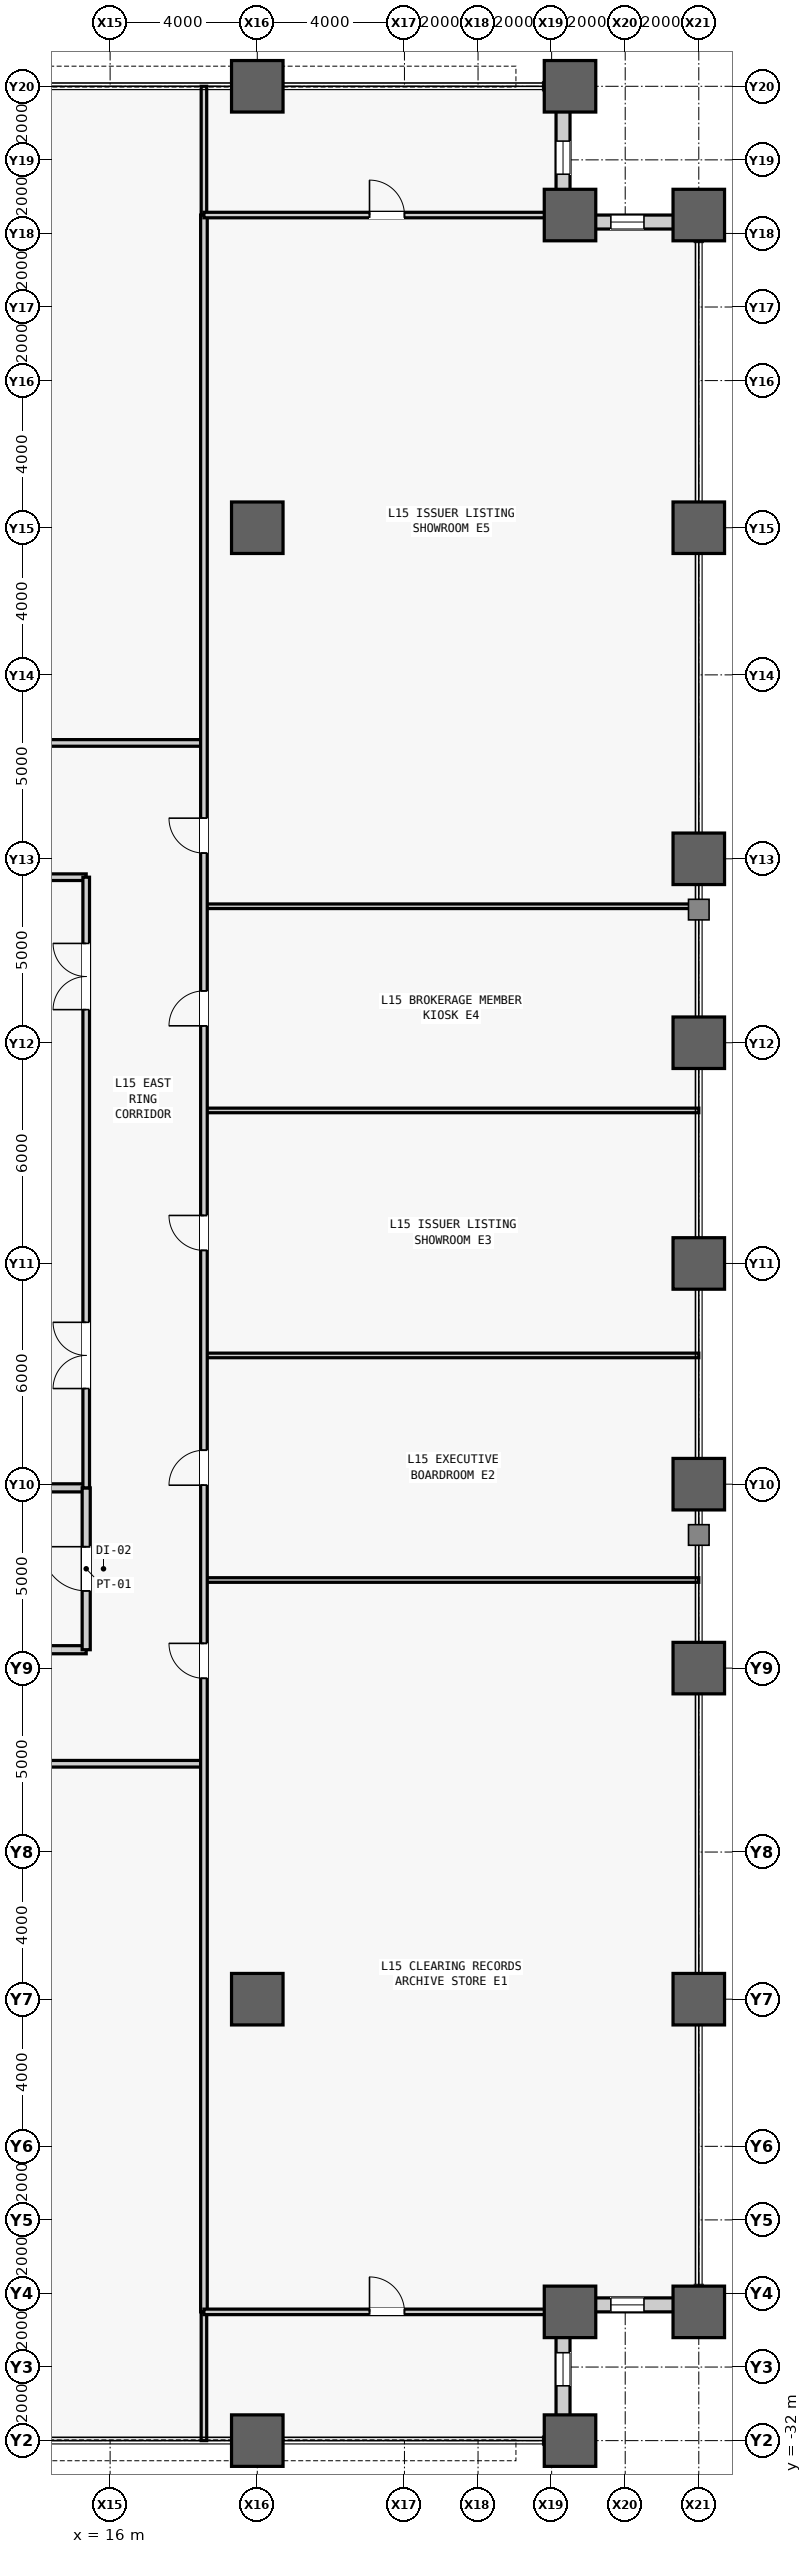
"""IFC4 building model, lengths in metres.
Left out: names, types, materials, properties, quantities, classifications, styles, units other than length and angle.
Written with IfcOpenShell. Run it as: python <this file> out.ifc"""

import sys

from ifc_helpers import new_model, si_unit, direction, frame, frame_2d, origin, origin_2d, place, context, subcontext, project, spatial, rectangle, hollow_rectangle, extrude, source, transform, mapped, element, fill, save


model = new_model("IFC4")
c1 = context("Model", 3, precision=1e-05, world=origin(), true_north=direction((0.0, 1.0)))
c2 = subcontext(c1, "Body", "Model", "MODEL_VIEW")
j1 = project(units=[si_unit("LENGTHUNIT", "METRE"), si_unit("PLANEANGLEUNIT", "RADIAN")], contexts=[c1])
p1 = place(None, origin())
s1 = spatial("IfcSite", under=j1, at=p1, CompositionType="ELEMENT")
p2 = place(p1, origin())
s2 = spatial("IfcBuilding", under=s1, at=p2, CompositionType="ELEMENT")
p3 = place(p2, frame((0.0, 0.0, 70.4)))
s3 = spatial("IfcBuildingStorey", under=s2, at=p3, CompositionType="ELEMENT", Elevation=70.4)
m1 = source(origin(), c2, "Body", "SweptSolid", [
    extrude(hollow_rectangle(XDim=1.4, YDim=1.4, WallThickness=0.075, at=origin_2d()), origin(), (0.0, 0.0, 1.0), 4.2),
])
for number, where, z_axis, x_axis in (
    (1, (20.0, -32.0, 0.0), (0.0, 0.0, 1.0), (1.0, 0.0, 0.0)),
    (2, (20.0, -20.0, 0.0), (0.0, 0.0, 1.0), (1.0, 0.0, 0.0)),
    (3, (20.0, 20.0, 0.0), (0.0, 0.0, 1.0), (1.0, 0.0, 0.0)),
    (4, (20.0, 32.0, 0.0), (0.0, 0.0, 1.0), (1.0, 0.0, 0.0)),
    (5, (28.5, -32.0, 0.0), (0.0, 0.0, 1.0), (1.0, 0.0, 0.0)),
    (6, (28.5, -28.5, 0.0), (0.0, 0.0, 1.0), (1.0, 0.0, 0.0)),
    (7, (28.5, 28.5, 0.0), (0.0, 0.0, 1.0), (1.0, 0.0, 0.0)),
    (8, (28.5, 32.0, 0.0), (0.0, 0.0, 1.0), (1.0, 0.0, 0.0)),
    (9, (32.0, -28.5, 0.0), (0.0, 0.0, 1.0), (1.0, 0.0, 0.0)),
    (10, (32.0, -20.0, 0.0), (0.0, 0.0, 1.0), (1.0, 0.0, 0.0)),
    (11, (32.0, -11.0, 0.0), (0.0, 0.0, 1.0), (1.0, 0.0, 0.0)),
    (12, (32.0, -6.0, 0.0), (0.0, 0.0, 1.0), (1.0, 0.0, 0.0)),
    (13, (32.0, 0.0, 0.0), (0.0, 0.0, 1.0), (1.0, 0.0, 0.0)),
    (14, (32.0, 6.0, 0.0), (0.0, 0.0, 1.0), (1.0, 0.0, 0.0)),
    (15, (32.0, 11.0, 0.0), (0.0, 0.0, 1.0), (1.0, 0.0, 0.0)),
    (16, (32.0, 20.0, 0.0), (0.0, 0.0, 1.0), (1.0, 0.0, 0.0)),
    (17, (32.0, 28.5, 0.0), (0.0, 0.0, 1.0), (1.0, 0.0, 0.0)),
):
    element("IfcColumn", number, at=place(p3, frame(where, z_axis=z_axis, x_axis=x_axis)), inside=s3, PredefinedType="COLUMN", context=c2, shape_type="MappedRepresentation", body=[
        mapped(m1, transform((0.0, 0.0, 0.0), scale=1.0)),
    ])
m2 = source(origin(), c2, "Body", "SweptSolid", [
    extrude(rectangle(XDim=3.12, YDim=0.38, at=frame_2d((1.56, 0.0))), origin(), (0.0, 0.0, 1.0), 3.245),
])
p4 = place(p3, frame((28.31, -31.62, 0.0), z_axis=(0.0, 0.0, 1.0), x_axis=(0.0, 1.0, 0.0)))
e18 = element("IfcWall", 18, at=p4, inside=s3, PredefinedType="STANDARD", context=c2, shape_type="MappedRepresentation", body=[
    mapped(m2, transform((0.0, 0.0, 0.0), scale=1.0)),
])
m3 = source(origin(), c2, "Body", "SweptSolid", [
    extrude(rectangle(XDim=0.9, YDim=2.4, at=frame_2d((0.45, 1.2))), frame((0.0, 0.2, 0.0), z_axis=(0.0, -1.0, 0.0), x_axis=(1.0, 0.0, 0.0)), (0.0, 0.0, 1.0), 0.4),
])
p5 = place(p4, frame((1.11, 0.0, 0.5)))
e19 = element("IfcOpeningElement", 19, at=p5, cuts=e18, PredefinedType="OPENING", context=c2, shape_type="MappedRepresentation", body=[
    mapped(m3, transform((0.0, 0.0, 0.0), scale=1.0)),
])
p6 = place(p3, frame((28.5, -28.31, 0.0), z_axis=(0.0, 0.0, 1.0), x_axis=(1.0, 0.0, 0.0)))
e20 = element("IfcWall", 20, at=p6, inside=s3, PredefinedType="STANDARD", context=c2, shape_type="MappedRepresentation", body=[
    mapped(m2, transform((0.0, 0.0, 0.0), scale=1.0)),
])
p7 = place(p6, frame((1.11, 0.0, 0.5)))
e21 = element("IfcOpeningElement", 21, at=p7, cuts=e20, PredefinedType="OPENING", context=c2, shape_type="MappedRepresentation", body=[
    mapped(m3, transform((0.0, 0.0, 0.0), scale=1.0)),
])
p8 = place(p3, frame((28.5, 28.31, 0.0), z_axis=(0.0, 0.0, 1.0), x_axis=(1.0, 0.0, 0.0)))
e22 = element("IfcWall", 22, at=p8, inside=s3, PredefinedType="STANDARD", context=c2, shape_type="MappedRepresentation", body=[
    mapped(m2, transform((0.0, 0.0, 0.0), scale=1.0)),
])
p9 = place(p8, frame((1.11, 0.0, 0.5)))
e23 = element("IfcOpeningElement", 23, at=p9, cuts=e22, PredefinedType="OPENING", context=c2, shape_type="MappedRepresentation", body=[
    mapped(m3, transform((0.0, 0.0, 0.0), scale=1.0)),
])
p10 = place(p3, frame((28.31, 28.5, 0.0), z_axis=(0.0, 0.0, 1.0), x_axis=(0.0, 1.0, 0.0)))
e24 = element("IfcWall", 24, at=p10, inside=s3, PredefinedType="STANDARD", context=c2, shape_type="MappedRepresentation", body=[
    mapped(m2, transform((0.0, 0.0, 0.0), scale=1.0)),
])
p11 = place(p10, frame((1.11, 0.0, 0.5)))
e25 = element("IfcOpeningElement", 25, at=p11, cuts=e24, PredefinedType="OPENING", context=c2, shape_type="MappedRepresentation", body=[
    mapped(m3, transform((0.0, 0.0, 0.0), scale=1.0)),
])
m4 = source(origin(), c2, "Body", "SweptSolid", [
    extrude(rectangle(XDim=4.05, YDim=0.22, at=frame_2d((2.025, 0.0))), origin(), (0.0, 0.0, 1.0), 3.94),
])
p12 = place(p3, frame((11.3, -10.5, 0.0), z_axis=(0.0, 0.0, 1.0), x_axis=(1.0, 0.0, 0.0)))
e26 = element("IfcWall", 26, at=p12, inside=s3, PredefinedType="PARTITIONING", context=c2, shape_type="MappedRepresentation", body=[
    mapped(m4, transform((0.0, 0.0, 0.0), scale=1.0)),
])
m5 = source(origin(), c2, "Body", "SweptSolid", [
    extrude(rectangle(XDim=4.05, YDim=0.22, at=frame_2d((2.025, 0.0))), origin(), (0.0, 0.0, 1.0), 3.085),
])
p13 = place(p3, frame((11.3, -6.1, 0.0), z_axis=(0.0, 0.0, 1.0), x_axis=(1.0, 0.0, 0.0)))
e27 = element("IfcWall", 27, at=p13, inside=s3, PredefinedType="PARTITIONING", context=c2, shape_type="MappedRepresentation", body=[
    mapped(m5, transform((0.0, 0.0, 0.0), scale=1.0)),
])
m6 = source(origin(), c2, "Body", "SweptSolid", [
    extrude(rectangle(XDim=4.4, YDim=0.22, at=frame_2d((2.2, 0.0))), origin(), (0.0, 0.0, 1.0), 3.94),
])
p14 = place(p3, frame((15.35, -10.5, 0.0), z_axis=(0.0, 0.0, 1.0), x_axis=(0.0, 1.0, 0.0)))
e28 = element("IfcWall", 28, at=p14, inside=s3, PredefinedType="PARTITIONING", context=c2, shape_type="MappedRepresentation", body=[
    mapped(m6, transform((0.0, 0.0, 0.0), scale=1.0)),
])
m7 = source(origin(), c2, "Body", "SweptSolid", [
    extrude(rectangle(XDim=1.2, YDim=2.2, at=frame_2d((0.6, 1.1))), frame((0.0, 0.12, 0.0), z_axis=(0.0, -1.0, 0.0), x_axis=(1.0, 0.0, 0.0)), (0.0, 0.0, 1.0), 0.24),
])
p15 = place(p14, frame((1.6, 0.0, 0.0)))
e29 = element("IfcOpeningElement", 29, at=p15, cuts=e28, PredefinedType="OPENING", context=c2, shape_type="MappedRepresentation", body=[
    mapped(m7, transform((0.0, 0.0, 0.0), scale=1.0)),
])
m8 = source(origin(), c2, "Body", "SweptSolid", [
    extrude(rectangle(XDim=4.05, YDim=0.18, at=frame_2d((2.025, 0.0))), origin(), (0.0, 0.0, 1.0), 3.94),
])
p16 = place(p3, frame((11.3, 10.5, 0.0), z_axis=(0.0, 0.0, 1.0), x_axis=(1.0, 0.0, 0.0)))
e30 = element("IfcWall", 30, at=p16, inside=s3, PredefinedType="PARTITIONING", context=c2, shape_type="MappedRepresentation", body=[
    mapped(m8, transform((0.0, 0.0, 0.0), scale=1.0)),
])
m9 = source(origin(), c2, "Body", "SweptSolid", [
    extrude(rectangle(XDim=16.6, YDim=0.18, at=frame_2d((8.3, 0.0))), origin(), (0.0, 0.0, 1.0), 3.94),
])
p17 = place(p3, frame((15.35, -6.1, 0.0), z_axis=(0.0, 0.0, 1.0), x_axis=(0.0, 1.0, 0.0)))
e31 = element("IfcWall", 31, at=p17, inside=s3, PredefinedType="PARTITIONING", context=c2, shape_type="MappedRepresentation", body=[
    mapped(m9, transform((0.0, 0.0, 0.0), scale=1.0)),
])
m10 = source(origin(), c2, "Body", "SweptSolid", [
    extrude(rectangle(XDim=1.8, YDim=2.25, at=frame_2d((0.9, 1.125))), frame((0.0, 0.1, 0.0), z_axis=(0.0, -1.0, 0.0), x_axis=(1.0, 0.0, 0.0)), (0.0, 0.0, 1.0), 0.2),
])
p18 = place(p17, frame((2.7, 0.0, 0.0)))
e32 = element("IfcOpeningElement", 32, at=p18, cuts=e31, PredefinedType="OPENING", context=c2, shape_type="MappedRepresentation", body=[
    mapped(m10, transform((0.0, 0.0, 0.0), scale=1.0)),
])
p19 = place(p17, frame((13.0, 0.0, 0.0)))
e33 = element("IfcOpeningElement", 33, at=p19, cuts=e31, PredefinedType="OPENING", context=c2, shape_type="MappedRepresentation", body=[
    mapped(m10, transform((0.0, 0.0, 0.0), scale=1.0)),
])
m11 = source(origin(), c2, "Body", "SweptSolid", [
    extrude(rectangle(XDim=36.25, YDim=0.18, at=frame_2d((18.125, 0.0))), origin(), (0.0, 0.0, 1.0), 3.94),
])
p20 = place(p3, frame((-17.7, -13.6, 0.0), z_axis=(0.0, 0.0, 1.0), x_axis=(1.0, 0.0, 0.0)))
e34 = element("IfcWall", 34, at=p20, inside=s3, PredefinedType="PARTITIONING", context=c2, shape_type="MappedRepresentation", body=[
    mapped(m11, transform((0.0, 0.0, 0.0), scale=1.0)),
])
m12 = source(origin(), c2, "Body", "SweptSolid", [
    extrude(rectangle(XDim=1.05, YDim=2.2, at=frame_2d((0.525, 1.1))), frame((0.0, 0.1, 0.0), z_axis=(0.0, -1.0, 0.0), x_axis=(1.0, 0.0, 0.0)), (0.0, 0.0, 1.0), 0.2),
])
p21 = place(p20, frame((10.55, 0.0, 0.0)))
e35 = element("IfcOpeningElement", 35, at=p21, cuts=e34, PredefinedType="OPENING", context=c2, shape_type="MappedRepresentation", body=[
    mapped(m12, transform((0.0, 0.0, 0.0), scale=1.0)),
])
p22 = place(p20, frame((24.95, 0.0, 0.0)))
e36 = element("IfcOpeningElement", 36, at=p22, cuts=e34, PredefinedType="OPENING", context=c2, shape_type="MappedRepresentation", body=[
    mapped(m12, transform((0.0, 0.0, 0.0), scale=1.0)),
])
p23 = place(p3, frame((-17.7, 14.15, 0.0), z_axis=(0.0, 0.0, 1.0), x_axis=(1.0, 0.0, 0.0)))
e37 = element("IfcWall", 37, at=p23, inside=s3, PredefinedType="PARTITIONING", context=c2, shape_type="MappedRepresentation", body=[
    mapped(m11, transform((0.0, 0.0, 0.0), scale=1.0)),
])
p24 = place(p23, frame((6.562, 0.0, 0.0)))
e38 = element("IfcOpeningElement", 38, at=p24, cuts=e37, PredefinedType="OPENING", context=c2, shape_type="MappedRepresentation", body=[
    mapped(m12, transform((0.0, 0.0, 0.0), scale=1.0)),
])
p25 = place(p23, frame((16.694, 0.0, 0.0)))
e39 = element("IfcOpeningElement", 39, at=p25, cuts=e37, PredefinedType="OPENING", context=c2, shape_type="MappedRepresentation", body=[
    mapped(m12, transform((0.0, 0.0, 0.0), scale=1.0)),
])
p26 = place(p23, frame((27.306, 0.0, 0.0)))
e40 = element("IfcOpeningElement", 40, at=p26, cuts=e37, PredefinedType="OPENING", context=c2, shape_type="MappedRepresentation", body=[
    mapped(m12, transform((0.0, 0.0, 0.0), scale=1.0)),
])
m13 = source(origin(), c2, "Body", "SweptSolid", [
    extrude(rectangle(XDim=3.5, YDim=0.15, at=frame_2d((1.75, 0.0))), origin(), (0.0, 0.0, 1.0), 3.94),
])
for number, where, z_axis, x_axis in (
    (41, (18.55, -32.0, 0.0), (0.0, 0.0, 1.0), (0.0, 1.0, 0.0)),
    (42, (18.55, 28.5, 0.0), (0.0, 0.0, 1.0), (0.0, 1.0, 0.0)),
):
    element("IfcWall", number, at=place(p3, frame(where, z_axis=z_axis, x_axis=x_axis)), inside=s3, PredefinedType="PARTITIONING", context=c2, shape_type="MappedRepresentation", body=[
        mapped(m13, transform((0.0, 0.0, 0.0), scale=1.0)),
    ])
m14 = source(origin(), c2, "Body", "SweptSolid", [
    extrude(rectangle(XDim=13.45, YDim=0.125, at=frame_2d((6.725, 0.0))), origin(), (0.0, 0.0, 1.0), 3.94),
])
for number, where, z_axis, x_axis in (
    (43, (18.55, -8.605, 0.0), (0.0, 0.0, 1.0), (1.0, 0.0, 0.0)),
    (44, (18.55, -2.5, 0.0), (0.0, 0.0, 1.0), (1.0, 0.0, 0.0)),
    (45, (18.55, 4.16, 0.0), (0.0, 0.0, 1.0), (1.0, 0.0, 0.0)),
    (46, (18.55, 9.71, 0.0), (0.0, 0.0, 1.0), (1.0, 0.0, 0.0)),
):
    element("IfcWall", number, at=place(p3, frame(where, z_axis=z_axis, x_axis=x_axis)), inside=s3, PredefinedType="PARTITIONING", context=c2, shape_type="MappedRepresentation", body=[
        mapped(m14, transform((0.0, 0.0, 0.0), scale=1.0)),
    ])
m15 = source(origin(), c2, "Body", "SweptSolid", [
    extrude(rectangle(XDim=57.0, YDim=0.18, at=frame_2d((28.5, 0.0))), origin(), (0.0, 0.0, 1.0), 3.94),
])
p27 = place(p3, frame((18.55, -28.5, 0.0), z_axis=(0.0, 0.0, 1.0), x_axis=(0.0, 1.0, 0.0)))
e47 = element("IfcWall", 47, at=p27, inside=s3, PredefinedType="PARTITIONING", context=c2, shape_type="MappedRepresentation", body=[
    mapped(m15, transform((0.0, 0.0, 0.0), scale=1.0)),
])
m16 = source(origin(), c2, "Body", "SweptSolid", [
    extrude(rectangle(XDim=0.95, YDim=2.15, at=frame_2d((0.475, 1.075))), frame((0.0, 0.1, 0.0), z_axis=(0.0, -1.0, 0.0), x_axis=(1.0, 0.0, 0.0)), (0.0, 0.0, 1.0), 0.2),
])
p28 = place(p27, frame((17.222, 0.0, 0.0)))
e48 = element("IfcOpeningElement", 48, at=p28, cuts=e47, PredefinedType="OPENING", context=c2, shape_type="MappedRepresentation", body=[
    mapped(m16, transform((0.0, 0.0, 0.0), scale=1.0)),
])
p29 = place(p27, frame((22.472, 0.0, 0.0)))
e49 = element("IfcOpeningElement", 49, at=p29, cuts=e47, PredefinedType="OPENING", context=c2, shape_type="MappedRepresentation", body=[
    mapped(m16, transform((0.0, 0.0, 0.0), scale=1.0)),
])
p30 = place(p27, frame((28.855, 0.0, 0.0)))
e50 = element("IfcOpeningElement", 50, at=p30, cuts=e47, PredefinedType="OPENING", context=c2, shape_type="MappedRepresentation", body=[
    mapped(m16, transform((0.0, 0.0, 0.0), scale=1.0)),
])
p31 = place(p27, frame((34.96, 0.0, 0.0)))
e51 = element("IfcOpeningElement", 51, at=p31, cuts=e47, PredefinedType="OPENING", context=c2, shape_type="MappedRepresentation", body=[
    mapped(m16, transform((0.0, 0.0, 0.0), scale=1.0)),
])
p32 = place(p27, frame((39.655, 0.0, 0.0)))
e52 = element("IfcOpeningElement", 52, at=p32, cuts=e47, PredefinedType="OPENING", context=c2, shape_type="MappedRepresentation", body=[
    mapped(m16, transform((0.0, 0.0, 0.0), scale=1.0)),
])
m17 = source(origin(), c2, "Body", "SweptSolid", [
    extrude(rectangle(XDim=9.95, YDim=0.15, at=frame_2d((4.975, 0.0))), origin(), (0.0, 0.0, 1.0), 3.94),
])
p33 = place(p3, frame((18.55, -28.5, 0.0), z_axis=(0.0, 0.0, 1.0), x_axis=(1.0, 0.0, 0.0)))
e53 = element("IfcWall", 53, at=p33, inside=s3, PredefinedType="PARTITIONING", context=c2, shape_type="MappedRepresentation", body=[
    mapped(m17, transform((0.0, 0.0, 0.0), scale=1.0)),
])
m18 = source(origin(), c2, "Body", "SweptSolid", [
    extrude(rectangle(XDim=0.95, YDim=2.15, at=frame_2d((0.475, 1.075))), frame((0.0, 0.085, 0.0), z_axis=(0.0, -1.0, 0.0), x_axis=(1.0, 0.0, 0.0)), (0.0, 0.0, 1.0), 0.17),
])
p34 = place(p33, frame((4.5, 0.0, 0.0)))
e54 = element("IfcOpeningElement", 54, at=p34, cuts=e53, PredefinedType="OPENING", context=c2, shape_type="MappedRepresentation", body=[
    mapped(m18, transform((0.0, 0.0, 0.0), scale=1.0)),
])
p35 = place(p3, frame((18.55, 28.5, 0.0), z_axis=(0.0, 0.0, 1.0), x_axis=(1.0, 0.0, 0.0)))
e55 = element("IfcWall", 55, at=p35, inside=s3, PredefinedType="PARTITIONING", context=c2, shape_type="MappedRepresentation", body=[
    mapped(m17, transform((0.0, 0.0, 0.0), scale=1.0)),
])
p36 = place(p35, frame((4.5, 0.0, 0.0)))
e56 = element("IfcOpeningElement", 56, at=p36, cuts=e55, PredefinedType="OPENING", context=c2, shape_type="MappedRepresentation", body=[
    mapped(m18, transform((0.0, 0.0, 0.0), scale=1.0)),
])
m19 = source(origin(), c2, "Body", "SweptSolid", [
    extrude(rectangle(XDim=0.9, YDim=2.4, at=frame_2d((0.45, 1.2))), frame((0.0, 0.03, 0.0), z_axis=(0.0, -1.0, 0.0), x_axis=(1.0, 0.0, 0.0)), (0.0, 0.0, 1.0), 0.06),
])
p37 = place(p5, origin())
e57 = element("IfcWindow", 57, at=p37, inside=s3, PartitioningType="SINGLE_PANEL", PredefinedType="WINDOW", context=c2, shape_type="MappedRepresentation", body=[
    mapped(m19, transform((0.0, 0.0, 0.0), scale=1.0)),
])
fill(e19, e57)
p38 = place(p7, origin())
e58 = element("IfcWindow", 58, at=p38, inside=s3, PartitioningType="SINGLE_PANEL", PredefinedType="WINDOW", context=c2, shape_type="MappedRepresentation", body=[
    mapped(m19, transform((0.0, 0.0, 0.0), scale=1.0)),
])
fill(e21, e58)
p39 = place(p9, origin())
e59 = element("IfcWindow", 59, at=p39, inside=s3, PartitioningType="SINGLE_PANEL", PredefinedType="WINDOW", context=c2, shape_type="MappedRepresentation", body=[
    mapped(m19, transform((0.0, 0.0, 0.0), scale=1.0)),
])
fill(e23, e59)
p40 = place(p11, origin())
e60 = element("IfcWindow", 60, at=p40, inside=s3, PartitioningType="SINGLE_PANEL", PredefinedType="WINDOW", context=c2, shape_type="MappedRepresentation", body=[
    mapped(m19, transform((0.0, 0.0, 0.0), scale=1.0)),
])
fill(e25, e60)
m20 = source(origin(), c2, "Body", "SweptSolid", [
    extrude(rectangle(XDim=1.2, YDim=2.2, at=frame_2d((0.6, 1.1))), frame((0.0, 0.025, 0.0), z_axis=(0.0, -1.0, 0.0), x_axis=(1.0, 0.0, 0.0)), (0.0, 0.0, 1.0), 0.05),
])
p41 = place(p15, origin())
e61 = element("IfcDoor", 61, at=p41, inside=s3, OperationType="SINGLE_SWING_RIGHT", PredefinedType="DOOR", context=c2, shape_type="MappedRepresentation", body=[
    mapped(m20, transform((0.0, 0.0, 0.0), scale=1.0)),
])
fill(e29, e61)
m21 = source(origin(), c2, "Body", "SweptSolid", [
    extrude(rectangle(XDim=1.8, YDim=2.25, at=frame_2d((0.9, 1.125))), frame((0.0, 0.025, 0.0), z_axis=(0.0, -1.0, 0.0), x_axis=(1.0, 0.0, 0.0)), (0.0, 0.0, 1.0), 0.05),
])
p42 = place(p18, origin())
e62 = element("IfcDoor", 62, at=p42, inside=s3, OperationType="SINGLE_SWING_RIGHT", PredefinedType="DOOR", context=c2, shape_type="MappedRepresentation", body=[
    mapped(m21, transform((0.0, 0.0, 0.0), scale=1.0)),
])
fill(e32, e62)
p43 = place(p19, origin())
e63 = element("IfcDoor", 63, at=p43, inside=s3, OperationType="SINGLE_SWING_LEFT", PredefinedType="DOOR", context=c2, shape_type="MappedRepresentation", body=[
    mapped(m21, transform((0.0, 0.0, 0.0), scale=1.0)),
])
fill(e33, e63)
m22 = source(origin(), c2, "Body", "SweptSolid", [
    extrude(rectangle(XDim=0.95, YDim=2.15, at=frame_2d((0.475, 1.075))), frame((0.0, 0.025, 0.0), z_axis=(0.0, -1.0, 0.0), x_axis=(1.0, 0.0, 0.0)), (0.0, 0.0, 1.0), 0.05),
])
p44 = place(p28, origin())
e64 = element("IfcDoor", 64, at=p44, inside=s3, OperationType="SINGLE_SWING_RIGHT", PredefinedType="DOOR", context=c2, shape_type="MappedRepresentation", body=[
    mapped(m22, transform((0.0, 0.0, 0.0), scale=1.0)),
])
fill(e48, e64)
p45 = place(p29, origin())
e65 = element("IfcDoor", 65, at=p45, inside=s3, OperationType="SINGLE_SWING_LEFT", PredefinedType="DOOR", context=c2, shape_type="MappedRepresentation", body=[
    mapped(m22, transform((0.0, 0.0, 0.0), scale=1.0)),
])
fill(e49, e65)
p46 = place(p30, origin())
e66 = element("IfcDoor", 66, at=p46, inside=s3, OperationType="SINGLE_SWING_RIGHT", PredefinedType="DOOR", context=c2, shape_type="MappedRepresentation", body=[
    mapped(m22, transform((0.0, 0.0, 0.0), scale=1.0)),
])
fill(e50, e66)
p47 = place(p31, origin())
e67 = element("IfcDoor", 67, at=p47, inside=s3, OperationType="SINGLE_SWING_LEFT", PredefinedType="DOOR", context=c2, shape_type="MappedRepresentation", body=[
    mapped(m22, transform((0.0, 0.0, 0.0), scale=1.0)),
])
fill(e51, e67)
p48 = place(p32, origin())
e68 = element("IfcDoor", 68, at=p48, inside=s3, OperationType="SINGLE_SWING_RIGHT", PredefinedType="DOOR", context=c2, shape_type="MappedRepresentation", body=[
    mapped(m22, transform((0.0, 0.0, 0.0), scale=1.0)),
])
fill(e52, e68)
p49 = place(p34, origin())
e69 = element("IfcDoor", 69, at=p49, inside=s3, OperationType="SINGLE_SWING_LEFT", PredefinedType="DOOR", context=c2, shape_type="MappedRepresentation", body=[
    mapped(m22, transform((0.0, 0.0, 0.0), scale=1.0)),
])
fill(e54, e69)
p50 = place(p36, origin())
e70 = element("IfcDoor", 70, at=p50, inside=s3, OperationType="SINGLE_SWING_LEFT", PredefinedType="DOOR", context=c2, shape_type="MappedRepresentation", body=[
    mapped(m22, transform((0.0, 0.0, 0.0), scale=1.0)),
])
fill(e56, e70)
save(model, sys.argv[1])
